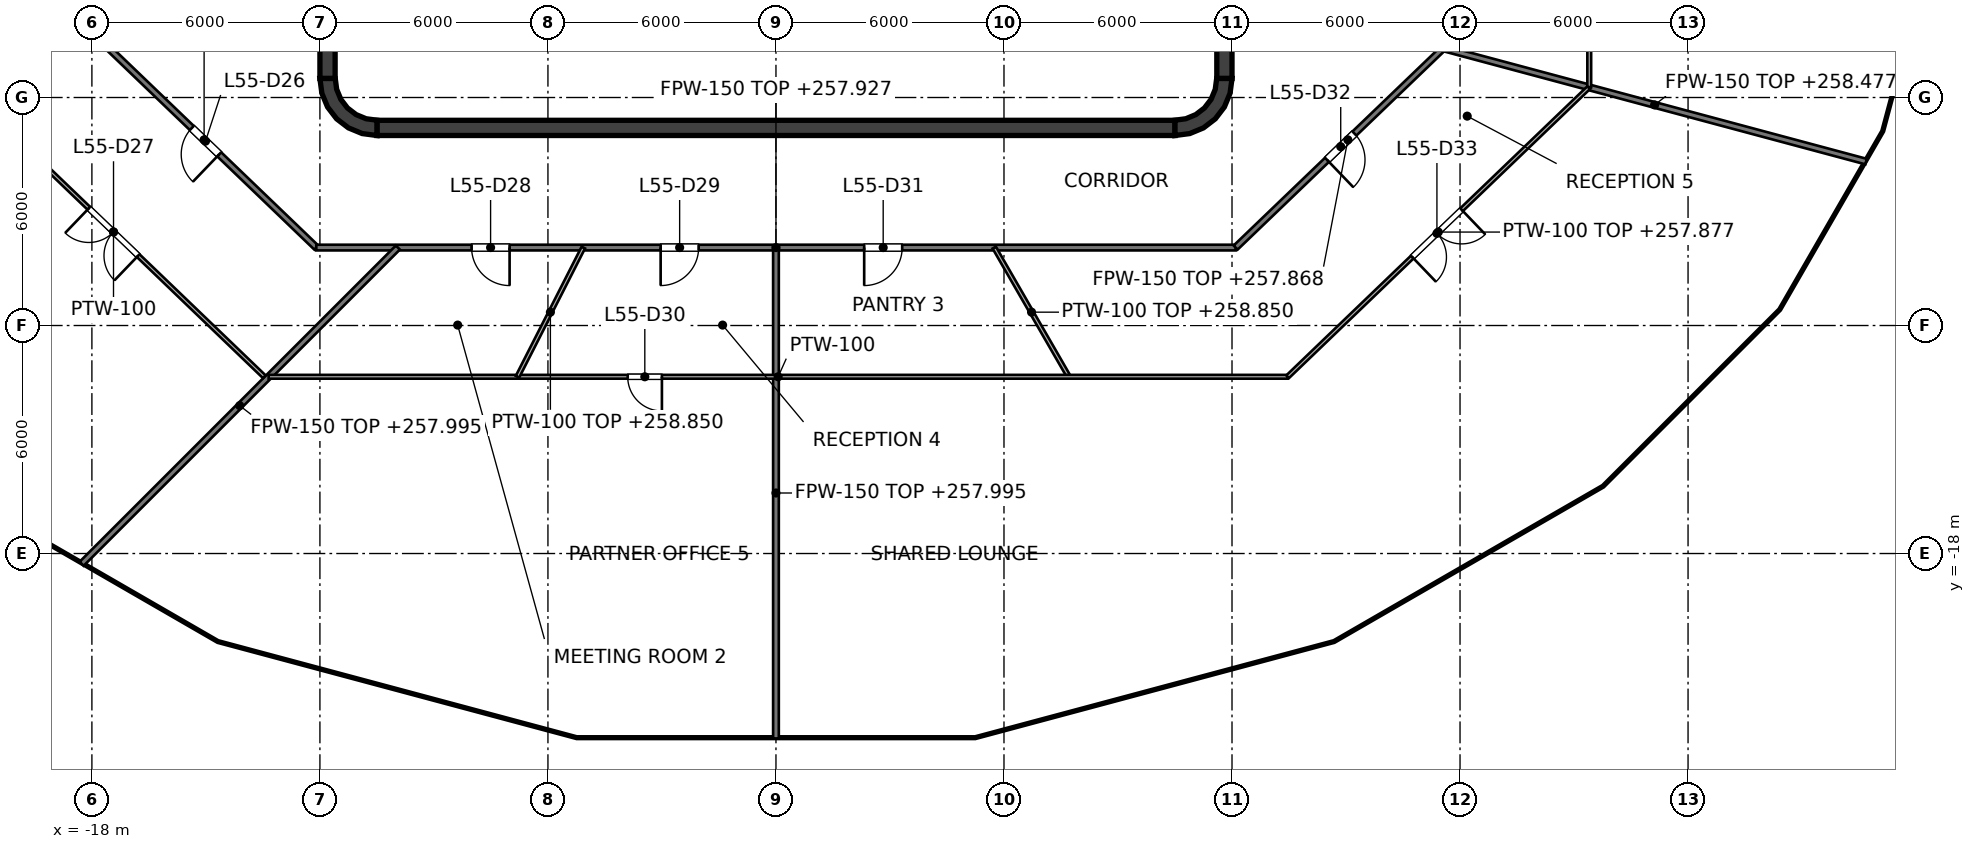
"""IFC4 building model, lengths in metres.
Left out: names, types, materials, properties, quantities, classifications, styles, units other than length and angle.
Written with IfcOpenShell. Run it as: python <this file> out.ifc"""

import sys

from ifc_helpers import new_model, si_unit, direction, frame, frame_2d, origin, place, context, subcontext, project, spatial, polyline, rectangle, outline, extrude, element, fill, save


model = new_model("IFC4")
c1 = context("Model", 3, precision=1e-05, world=origin(), true_north=direction((0.0, 1.0)))
c2 = subcontext(c1, "Body", "Model", "MODEL_VIEW")
j1 = project(units=[si_unit("LENGTHUNIT", "METRE"), si_unit("PLANEANGLEUNIT", "RADIAN")], contexts=[c1])
p1 = place(None, origin())
s1 = spatial("IfcSite", under=j1, at=p1, CompositionType="ELEMENT")
p2 = place(p1, origin())
s2 = spatial("IfcBuilding", under=s1, at=p2, CompositionType="ELEMENT")
p3 = place(p2, frame((0.0, 0.0, 255.0)))
s3 = spatial("IfcBuildingStorey", under=s2, at=p3, CompositionType="ELEMENT", Elevation=255.0)
p4 = place(p3, frame((-10.5, -6.8, 0.0), z_axis=(0.0, 0.0, 1.0), x_axis=(1.0, 0.0, 0.0)))
e1 = element("IfcWall", 1, at=p4, inside=s3, PredefinedType="SHEAR", context=c2, shape_type="SweptSolid", body=[
    extrude(rectangle(XDim=21.0, YDim=0.4, at=frame_2d((10.5, 0.0))), origin(), (0.0, 0.0, 1.0), 4.0),
])
p5 = place(p3, frame((11.8, -5.5, 0.0), z_axis=(0.0, 0.0, 1.0), x_axis=(0.0, 1.0, 0.0)))
e2 = element("IfcWall", 2, at=p5, inside=s3, PredefinedType="SHEAR", context=c2, shape_type="SweptSolid", body=[
    extrude(rectangle(XDim=11.0, YDim=0.4, at=frame_2d((5.5, 0.0))), origin(), (0.0, 0.0, 1.0), 4.0),
])
p6 = place(p5, frame((3.2, 0.0, 0.0)))
e3 = element("IfcOpeningElement", 3, at=p6, cuts=e2, PredefinedType="OPENING", context=c2, shape_type="SweptSolid", body=[
    extrude(rectangle(XDim=1.0, YDim=2.1, at=frame_2d((0.5, 1.05))), frame((0.0, 0.2, 0.0), z_axis=(0.0, -1.0, 0.0), x_axis=(1.0, 0.0, 0.0)), (0.0, 0.0, 1.0), 0.4),
])
p7 = place(p5, frame((6.1, 0.0, 0.0)))
e4 = element("IfcOpeningElement", 4, at=p7, cuts=e2, PredefinedType="OPENING", context=c2, shape_type="SweptSolid", body=[
    extrude(rectangle(XDim=1.0, YDim=2.1, at=frame_2d((0.5, 1.05))), frame((0.0, 0.2, 0.0), z_axis=(0.0, -1.0, 0.0), x_axis=(1.0, 0.0, 0.0)), (0.0, 0.0, 1.0), 0.4),
])
p8 = place(p5, frame((0.9, 0.0, 0.0)))
e5 = element("IfcOpeningElement", 5, at=p8, cuts=e2, PredefinedType="OPENING", context=c2, shape_type="SweptSolid", body=[
    extrude(rectangle(XDim=1.2, YDim=2.1, at=frame_2d((0.6, 1.05))), frame((0.0, 0.2, 0.0), z_axis=(0.0, -1.0, 0.0), x_axis=(1.0, 0.0, 0.0)), (0.0, 0.0, 1.0), 0.4),
])
p9 = place(p5, frame((8.9, 0.0, 0.0)))
e6 = element("IfcOpeningElement", 6, at=p9, cuts=e2, PredefinedType="OPENING", context=c2, shape_type="SweptSolid", body=[
    extrude(rectangle(XDim=1.2, YDim=2.1, at=frame_2d((0.6, 1.05))), frame((0.0, 0.2, 0.0), z_axis=(0.0, -1.0, 0.0), x_axis=(1.0, 0.0, 0.0)), (0.0, 0.0, 1.0), 0.4),
])
p10 = place(p3, frame((-11.8, -5.5, 0.0), z_axis=(0.0, 0.0, 1.0), x_axis=(0.0, 1.0, 0.0)))
e7 = element("IfcWall", 7, at=p10, inside=s3, PredefinedType="SHEAR", context=c2, shape_type="SweptSolid", body=[
    extrude(rectangle(XDim=11.0, YDim=0.4, at=frame_2d((5.5, 0.0))), origin(), (0.0, 0.0, 1.0), 4.0),
])
p11 = place(p10, frame((3.8, 0.0, 0.0)))
e8 = element("IfcOpeningElement", 8, at=p11, cuts=e7, PredefinedType="OPENING", context=c2, shape_type="SweptSolid", body=[
    extrude(rectangle(XDim=1.0, YDim=2.1, at=frame_2d((0.5, 1.05))), frame((0.0, 0.2, 0.0), z_axis=(0.0, -1.0, 0.0), x_axis=(1.0, 0.0, 0.0)), (0.0, 0.0, 1.0), 0.4),
])
p12 = place(p10, frame((6.7, 0.0, 0.0)))
e9 = element("IfcOpeningElement", 9, at=p12, cuts=e7, PredefinedType="OPENING", context=c2, shape_type="SweptSolid", body=[
    extrude(rectangle(XDim=1.0, YDim=2.1, at=frame_2d((0.5, 1.05))), frame((0.0, 0.2, 0.0), z_axis=(0.0, -1.0, 0.0), x_axis=(1.0, 0.0, 0.0)), (0.0, 0.0, 1.0), 0.4),
])
p13 = place(p10, frame((0.9, 0.0, 0.0)))
e10 = element("IfcOpeningElement", 10, at=p13, cuts=e7, PredefinedType="OPENING", context=c2, shape_type="SweptSolid", body=[
    extrude(rectangle(XDim=1.2, YDim=2.1, at=frame_2d((0.6, 1.05))), frame((0.0, 0.2, 0.0), z_axis=(0.0, -1.0, 0.0), x_axis=(1.0, 0.0, 0.0)), (0.0, 0.0, 1.0), 0.4),
])
p14 = place(p10, frame((8.9, 0.0, 0.0)))
e11 = element("IfcOpeningElement", 11, at=p14, cuts=e7, PredefinedType="OPENING", context=c2, shape_type="SweptSolid", body=[
    extrude(rectangle(XDim=1.2, YDim=2.1, at=frame_2d((0.6, 1.05))), frame((0.0, 0.2, 0.0), z_axis=(0.0, -1.0, 0.0), x_axis=(1.0, 0.0, 0.0)), (0.0, 0.0, 1.0), 0.4),
])
p15 = place(p3, origin())
e12 = element("IfcWall", 12, at=p15, inside=s3, PredefinedType="SHEAR", context=c2, shape_type="SweptSolid", body=[
    extrude(outline(polyline([(-10.5, -7.0), (-10.5, -6.596), (-10.784, -6.559), (-11.048, -6.45), (-11.275, -6.275), (-11.45, -6.048), (-11.559, -5.784), (-11.596, -5.5), (-12.0, -5.5), (-11.949, -5.888), (-11.799, -6.25), (-11.561, -6.561), (-11.25, -6.799), (-10.888, -6.949), (-10.5, -7.0)])), origin(), (0.0, 0.0, 1.0), 4.0),
])
e13 = element("IfcWall", 13, at=p15, inside=s3, PredefinedType="SHEAR", context=c2, shape_type="SweptSolid", body=[
    extrude(outline(polyline([(12.0, -5.5), (11.596, -5.5), (11.559, -5.784), (11.45, -6.048), (11.275, -6.275), (11.048, -6.45), (10.784, -6.559), (10.5, -6.596), (10.5, -7.0), (10.888, -6.949), (11.25, -6.799), (11.561, -6.561), (11.799, -6.25), (11.949, -5.888), (12.0, -5.5)])), origin(), (0.0, 0.0, 1.0), 4.0),
])
p16 = place(p3, frame((-1.2, -6.6, 0.0), z_axis=(0.0, 0.0, 1.0), x_axis=(0.0, 1.0, 0.0)))
e14 = element("IfcWall", 14, at=p16, inside=s3, PredefinedType="PARTITIONING", context=c2, shape_type="SweptSolid", body=[
    extrude(rectangle(XDim=2.5, YDim=0.15, at=frame_2d((1.25, 0.0))), origin(), (0.0, 0.0, 1.0), 3.85),
])
p17 = place(p16, frame((0.8, 0.0, 0.0)))
e15 = element("IfcOpeningElement", 15, at=p17, cuts=e14, PredefinedType="OPENING", context=c2, shape_type="SweptSolid", body=[
    extrude(rectangle(XDim=0.9, YDim=2.1, at=frame_2d((0.45, 1.05))), frame((0.0, 0.075, 0.0), z_axis=(0.0, -1.0, 0.0), x_axis=(1.0, 0.0, 0.0)), (0.0, 0.0, 1.0), 0.15),
])
p18 = place(p3, frame((9.0, -6.6, 0.0), z_axis=(0.0, 0.0, 1.0), x_axis=(0.0, 1.0, 0.0)))
e16 = element("IfcWall", 16, at=p18, inside=s3, PredefinedType="SOLIDWALL", context=c2, shape_type="SweptSolid", body=[
    extrude(rectangle(XDim=2.5, YDim=0.25, at=frame_2d((1.25, 0.0))), origin(), (0.0, 0.0, 1.0), 3.85),
])
p19 = place(p18, frame((0.65, 0.0, 0.0)))
e17 = element("IfcOpeningElement", 17, at=p19, cuts=e16, PredefinedType="OPENING", context=c2, shape_type="SweptSolid", body=[
    extrude(rectangle(XDim=1.2, YDim=2.1, at=frame_2d((0.6, 1.05))), frame((0.0, 0.125, 0.0), z_axis=(0.0, -1.0, 0.0), x_axis=(1.0, 0.0, 0.0)), (0.0, 0.0, 1.0), 0.25),
])
p20 = place(p3, frame((-9.0, -6.6, 0.0), z_axis=(0.0, 0.0, 1.0), x_axis=(0.0, 1.0, 0.0)))
e18 = element("IfcWall", 18, at=p20, inside=s3, PredefinedType="PARTITIONING", context=c2, shape_type="SweptSolid", body=[
    extrude(rectangle(XDim=2.5, YDim=0.25, at=frame_2d((1.25, 0.0))), origin(), (0.0, 0.0, 1.0), 3.85),
])
p21 = place(p20, frame((0.75, 0.0, 0.0)))
e19 = element("IfcOpeningElement", 19, at=p21, cuts=e18, PredefinedType="OPENING", context=c2, shape_type="SweptSolid", body=[
    extrude(rectangle(XDim=1.0, YDim=2.1, at=frame_2d((0.5, 1.05))), frame((0.0, 0.125, 0.0), z_axis=(0.0, -1.0, 0.0), x_axis=(1.0, 0.0, 0.0)), (0.0, 0.0, 1.0), 0.25),
])
p22 = place(p3, frame((3.15, -6.6, 0.0), z_axis=(0.0, 0.0, 1.0), x_axis=(0.0, 1.0, 0.0)))
e20 = element("IfcWall", 20, at=p22, inside=s3, PredefinedType="SOLIDWALL", context=c2, shape_type="SweptSolid", body=[
    extrude(rectangle(XDim=2.5, YDim=0.25, at=frame_2d((1.25, 0.0))), origin(), (0.0, 0.0, 1.0), 3.85),
])
p23 = place(p3, frame((-2.9, -6.6, 0.0), z_axis=(0.0, 0.0, 1.0), x_axis=(0.0, 1.0, 0.0)))
e21 = element("IfcWall", 21, at=p23, inside=s3, PredefinedType="PARTITIONING", context=c2, shape_type="SweptSolid", body=[
    extrude(rectangle(XDim=2.5, YDim=0.25, at=frame_2d((1.25, 0.0))), origin(), (0.0, 0.0, 1.0), 3.85),
])
p24 = place(p23, frame((0.8, 0.0, 0.0)))
e22 = element("IfcOpeningElement", 22, at=p24, cuts=e21, PredefinedType="OPENING", context=c2, shape_type="SweptSolid", body=[
    extrude(rectangle(XDim=0.9, YDim=2.1, at=frame_2d((0.45, 1.05))), frame((0.0, 0.125, 0.0), z_axis=(0.0, -1.0, 0.0), x_axis=(1.0, 0.0, 0.0)), (0.0, 0.0, 1.0), 0.25),
])
p25 = place(p3, frame((-18.0, -4.278, 0.0), z_axis=(0.0, 0.0, 1.0), x_axis=(0.721290181137, -0.692633001376, 0.0)))
e23 = element("IfcWall", 23, at=p25, inside=s3, PredefinedType="PARTITIONING", context=c2, shape_type="SweptSolid", body=[
    extrude(rectangle(XDim=8.187, YDim=0.15, at=frame_2d((4.094, 0.0))), origin(), (0.0, 0.0, 1.0), 2.918),
])
p26 = place(p25, frame((3.645, 0.0, 0.0)))
e24 = element("IfcOpeningElement", 24, at=p26, cuts=e23, PredefinedType="OPENING", context=c2, shape_type="SweptSolid", body=[
    extrude(rectangle(XDim=1.0, YDim=2.1, at=frame_2d((0.5, 1.05))), frame((0.0, 0.075, 0.0), z_axis=(0.0, -1.0, 0.0), x_axis=(1.0, 0.0, 0.0)), (0.0, 0.0, 1.0), 0.15),
])
p27 = place(p3, frame((17.556, -4.704, 0.0), z_axis=(0.0, 0.0, 1.0), x_axis=(0.9659158877, -0.258856133573, 0.0)))
e25 = element("IfcWall", 25, at=p27, inside=s3, PredefinedType="PARTITIONING", context=c2, shape_type="SweptSolid", body=[
    extrude(rectangle(XDim=11.521, YDim=0.15, at=frame_2d((5.76, 0.0))), origin(), (0.0, 0.0, 1.0), 3.477),
])
p28 = place(p3, frame((-12.095, -9.949, 0.0), z_axis=(0.0, 0.0, 1.0), x_axis=(1.0, 0.0, 0.0)))
e26 = element("IfcWall", 26, at=p28, inside=s3, PredefinedType="PARTITIONING", context=c2, shape_type="SweptSolid", body=[
    extrude(rectangle(XDim=24.19, YDim=0.15, at=frame_2d((12.095, 0.0))), origin(), (0.0, 0.0, 1.0), 2.927),
])
p29 = place(p28, frame((4.086, 0.0, 0.0)))
e27 = element("IfcOpeningElement", 27, at=p29, cuts=e26, PredefinedType="OPENING", context=c2, shape_type="SweptSolid", body=[
    extrude(rectangle(XDim=1.0, YDim=2.1, at=frame_2d((0.5, 1.05))), frame((0.0, 0.075, 0.0), z_axis=(0.0, -1.0, 0.0), x_axis=(1.0, 0.0, 0.0)), (0.0, 0.0, 1.0), 0.15),
])
p30 = place(p28, frame((9.061, 0.0, 0.0)))
e28 = element("IfcOpeningElement", 28, at=p30, cuts=e26, PredefinedType="OPENING", context=c2, shape_type="SweptSolid", body=[
    extrude(rectangle(XDim=1.0, YDim=2.1, at=frame_2d((0.5, 1.05))), frame((0.0, 0.075, 0.0), z_axis=(0.0, -1.0, 0.0), x_axis=(1.0, 0.0, 0.0)), (0.0, 0.0, 1.0), 0.15),
])
p31 = place(p28, frame((14.417, 0.0, 0.0)))
e29 = element("IfcOpeningElement", 29, at=p31, cuts=e26, PredefinedType="OPENING", context=c2, shape_type="SweptSolid", body=[
    extrude(rectangle(XDim=1.0, YDim=2.1, at=frame_2d((0.5, 1.05))), frame((0.0, 0.075, 0.0), z_axis=(0.0, -1.0, 0.0), x_axis=(1.0, 0.0, 0.0)), (0.0, 0.0, 1.0), 0.15),
])
p32 = place(p3, frame((12.095, -9.949, 0.0), z_axis=(0.0, 0.0, 1.0), x_axis=(0.721348586031, 0.692572174889, 0.0)))
e30 = element("IfcWall", 30, at=p32, inside=s3, PredefinedType="PARTITIONING", context=c2, shape_type="SweptSolid", body=[
    extrude(rectangle(XDim=8.187, YDim=0.15, at=frame_2d((4.094, 0.0))), origin(), (0.0, 0.0, 1.0), 2.868),
])
p33 = place(p32, frame((3.334, 0.0, 0.0)))
e31 = element("IfcOpeningElement", 31, at=p33, cuts=e30, PredefinedType="OPENING", context=c2, shape_type="SweptSolid", body=[
    extrude(rectangle(XDim=1.0, YDim=2.1, at=frame_2d((0.5, 1.05))), frame((0.0, 0.075, 0.0), z_axis=(0.0, -1.0, 0.0), x_axis=(1.0, 0.0, 0.0)), (0.0, 0.0, 1.0), 0.15),
])
p34 = place(p3, frame((-18.27, -18.27, 0.0), z_axis=(0.0, 0.0, 1.0), x_axis=(0.707106781187, 0.707106781187, 0.0)))
e32 = element("IfcWall", 32, at=p34, inside=s3, PredefinedType="PARTITIONING", context=c2, shape_type="SweptSolid", body=[
    extrude(rectangle(XDim=11.768, YDim=0.15, at=frame_2d((5.884, 0.0))), origin(), (0.0, 0.0, 1.0), 2.995),
])
p35 = place(p3, frame((0.0, -22.866, 0.0), z_axis=(0.0, 0.0, 1.0), x_axis=(0.0, 1.0, 0.0)))
e33 = element("IfcWall", 33, at=p35, inside=s3, PredefinedType="PARTITIONING", context=c2, shape_type="SweptSolid", body=[
    extrude(rectangle(XDim=12.917, YDim=0.15, at=frame_2d((6.458, 0.0))), origin(), (0.0, 0.0, 1.0), 2.995),
])
p36 = place(p3, frame((5.744, -9.949, 0.0), z_axis=(0.0, 0.0, 1.0), x_axis=(0.500011323479, -0.866018866072, 0.0)))
e34 = element("IfcWall", 34, at=p36, inside=s3, PredefinedType="PARTITIONING", context=c2, shape_type="SweptSolid", body=[
    extrude(rectangle(XDim=3.926, YDim=0.1, at=frame_2d((1.963, 0.0))), origin(), (0.0, 0.0, 1.0), 3.85),
])
p37 = place(p3, frame((-21.4, -5.727, 0.0), z_axis=(0.0, 0.0, 1.0), x_axis=(0.72128312314, -0.692640351317, 0.0)))
e35 = element("IfcWall", 35, at=p37, inside=s3, PredefinedType="PARTITIONING", context=c2, shape_type="SweptSolid", body=[
    extrude(rectangle(XDim=11.004, YDim=0.1, at=frame_2d((5.502, 0.0))), origin(), (0.0, 0.0, 1.0), 2.927),
])
p38 = place(p37, frame((4.603, 0.0, 0.0)))
e36 = element("IfcOpeningElement", 36, at=p38, cuts=e35, PredefinedType="OPENING", context=c2, shape_type="SweptSolid", body=[
    extrude(rectangle(XDim=1.8, YDim=2.1, at=frame_2d((0.9, 1.05))), frame((0.0, 0.05, 0.0), z_axis=(0.0, -1.0, 0.0), x_axis=(1.0, 0.0, 0.0)), (0.0, 0.0, 1.0), 0.1),
])
p39 = place(p3, frame((-13.349, -13.349, 0.0), z_axis=(0.0, 0.0, 1.0), x_axis=(1.0, 0.0, 0.0)))
e37 = element("IfcWall", 37, at=p39, inside=s3, PredefinedType="PARTITIONING", context=c2, shape_type="SweptSolid", body=[
    extrude(rectangle(XDim=26.812, YDim=0.1, at=frame_2d((13.406, 0.0))), origin(), (0.0, 0.0, 1.0), 2.927),
])
p40 = place(p39, frame((9.448, 0.0, 0.0)))
e38 = element("IfcOpeningElement", 38, at=p40, cuts=e37, PredefinedType="OPENING", context=c2, shape_type="SweptSolid", body=[
    extrude(rectangle(XDim=0.9, YDim=2.1, at=frame_2d((0.45, 1.05))), frame((0.0, 0.05, 0.0), z_axis=(0.0, -1.0, 0.0), x_axis=(1.0, 0.0, 0.0)), (0.0, 0.0, 1.0), 0.1),
])
p41 = place(p3, frame((13.463, -13.349, 0.0), z_axis=(0.0, 0.0, 1.0), x_axis=(0.721271950356, 0.692651985942, 0.0)))
e39 = element("IfcWall", 39, at=p41, inside=s3, PredefinedType="PARTITIONING", context=c2, shape_type="SweptSolid", body=[
    extrude(rectangle(XDim=10.996, YDim=0.1, at=frame_2d((5.498, 0.0))), origin(), (0.0, 0.0, 1.0), 2.877),
])
p42 = place(p41, frame((4.547, 0.0, 0.0)))
e40 = element("IfcOpeningElement", 40, at=p42, cuts=e39, PredefinedType="OPENING", context=c2, shape_type="SweptSolid", body=[
    extrude(rectangle(XDim=1.8, YDim=2.1, at=frame_2d((0.9, 1.05))), frame((0.0, 0.05, 0.0), z_axis=(0.0, -1.0, 0.0), x_axis=(1.0, 0.0, 0.0)), (0.0, 0.0, 1.0), 0.1),
])
p43 = place(p3, frame((-6.802, -13.349, 0.0), z_axis=(0.0, 0.0, 1.0), x_axis=(0.454083899838, 0.890958928295, 0.0)))
e41 = element("IfcWall", 41, at=p43, inside=s3, PredefinedType="PARTITIONING", context=c2, shape_type="SweptSolid", body=[
    extrude(rectangle(XDim=3.816, YDim=0.1, at=frame_2d((1.908, 0.0))), origin(), (0.0, 0.0, 1.0), 3.85),
])
p44 = place(p3, frame((21.4, -5.727, 0.0), z_axis=(0.0, 0.0, 1.0), x_axis=(0.0, 1.0, 0.0)))
e42 = element("IfcWall", 42, at=p44, inside=s3, PredefinedType="PARTITIONING", context=c2, shape_type="SweptSolid", body=[
    extrude(rectangle(XDim=11.454, YDim=0.1, at=frame_2d((5.727, 0.0))), origin(), (0.0, 0.0, 1.0), 2.868),
])
p45 = place(p19, origin())
e43 = element("IfcDoor", 43, at=p45, inside=s3, OperationType="SINGLE_SWING_LEFT", PredefinedType="DOOR", context=c2, shape_type="SweptSolid", body=[
    extrude(rectangle(XDim=1.2, YDim=2.1, at=frame_2d((0.6, 1.05))), frame((0.0, 0.025, 0.0), z_axis=(0.0, -1.0, 0.0), x_axis=(1.0, 0.0, 0.0)), (0.0, 0.0, 1.0), 0.05),
])
fill(e17, e43)
p46 = place(p21, origin())
e44 = element("IfcDoor", 44, at=p46, inside=s3, OperationType="SINGLE_SWING_LEFT", PredefinedType="DOOR", context=c2, shape_type="SweptSolid", body=[
    extrude(rectangle(XDim=1.0, YDim=2.1, at=frame_2d((0.5, 1.05))), frame((0.0, 0.025, 0.0), z_axis=(0.0, -1.0, 0.0), x_axis=(1.0, 0.0, 0.0)), (0.0, 0.0, 1.0), 0.05),
])
fill(e19, e44)
p47 = place(p24, origin())
e45 = element("IfcDoor", 45, at=p47, inside=s3, OperationType="SINGLE_SWING_RIGHT", PredefinedType="DOOR", context=c2, shape_type="SweptSolid", body=[
    extrude(rectangle(XDim=0.9, YDim=2.1, at=frame_2d((0.45, 1.05))), frame((0.0, 0.025, 0.0), z_axis=(0.0, -1.0, 0.0), x_axis=(1.0, 0.0, 0.0)), (0.0, 0.0, 1.0), 0.05),
])
fill(e22, e45)
p48 = place(p17, origin())
e46 = element("IfcDoor", 46, at=p48, inside=s3, OperationType="SINGLE_SWING_RIGHT", PredefinedType="DOOR", context=c2, shape_type="SweptSolid", body=[
    extrude(rectangle(XDim=0.9, YDim=2.1, at=frame_2d((0.45, 1.05))), frame((0.0, 0.025, 0.0), z_axis=(0.0, -1.0, 0.0), x_axis=(1.0, 0.0, 0.0)), (0.0, 0.0, 1.0), 0.05),
])
fill(e15, e46)
p49 = place(p26, origin())
e47 = element("IfcDoor", 47, at=p49, inside=s3, OperationType="SINGLE_SWING_RIGHT", PredefinedType="DOOR", context=c2, shape_type="SweptSolid", body=[
    extrude(rectangle(XDim=1.0, YDim=2.1, at=frame_2d((0.5, 1.05))), frame((0.0, 0.025, 0.0), z_axis=(0.0, -1.0, 0.0), x_axis=(1.0, 0.0, 0.0)), (0.0, 0.0, 1.0), 0.05),
])
fill(e24, e47)
p50 = place(p38, origin())
e48 = element("IfcDoor", 48, at=p50, inside=s3, OperationType="DOUBLE_DOOR_SINGLE_SWING", PredefinedType="DOOR", context=c2, shape_type="SweptSolid", body=[
    extrude(rectangle(XDim=1.8, YDim=2.1, at=frame_2d((0.9, 1.05))), frame((0.0, 0.025, 0.0), z_axis=(0.0, -1.0, 0.0), x_axis=(1.0, 0.0, 0.0)), (0.0, 0.0, 1.0), 0.05),
])
fill(e36, e48)
p51 = place(p29, origin())
e49 = element("IfcDoor", 49, at=p51, inside=s3, OperationType="SINGLE_SWING_RIGHT", PredefinedType="DOOR", context=c2, shape_type="SweptSolid", body=[
    extrude(rectangle(XDim=1.0, YDim=2.1, at=frame_2d((0.5, 1.05))), frame((0.0, 0.025, 0.0), z_axis=(0.0, -1.0, 0.0), x_axis=(1.0, 0.0, 0.0)), (0.0, 0.0, 1.0), 0.05),
])
fill(e27, e49)
p52 = place(p30, origin())
e50 = element("IfcDoor", 50, at=p52, inside=s3, OperationType="SINGLE_SWING_LEFT", PredefinedType="DOOR", context=c2, shape_type="SweptSolid", body=[
    extrude(rectangle(XDim=1.0, YDim=2.1, at=frame_2d((0.5, 1.05))), frame((0.0, 0.025, 0.0), z_axis=(0.0, -1.0, 0.0), x_axis=(1.0, 0.0, 0.0)), (0.0, 0.0, 1.0), 0.05),
])
fill(e28, e50)
p53 = place(p40, origin())
e51 = element("IfcDoor", 51, at=p53, inside=s3, OperationType="SINGLE_SWING_RIGHT", PredefinedType="DOOR", context=c2, shape_type="SweptSolid", body=[
    extrude(rectangle(XDim=0.9, YDim=2.1, at=frame_2d((0.45, 1.05))), frame((0.0, 0.025, 0.0), z_axis=(0.0, -1.0, 0.0), x_axis=(1.0, 0.0, 0.0)), (0.0, 0.0, 1.0), 0.05),
])
fill(e38, e51)
p54 = place(p31, origin())
e52 = element("IfcDoor", 52, at=p54, inside=s3, OperationType="SINGLE_SWING_LEFT", PredefinedType="DOOR", context=c2, shape_type="SweptSolid", body=[
    extrude(rectangle(XDim=1.0, YDim=2.1, at=frame_2d((0.5, 1.05))), frame((0.0, 0.025, 0.0), z_axis=(0.0, -1.0, 0.0), x_axis=(1.0, 0.0, 0.0)), (0.0, 0.0, 1.0), 0.05),
])
fill(e29, e52)
p55 = place(p33, origin())
e53 = element("IfcDoor", 53, at=p55, inside=s3, OperationType="SINGLE_SWING_LEFT", PredefinedType="DOOR", context=c2, shape_type="SweptSolid", body=[
    extrude(rectangle(XDim=1.0, YDim=2.1, at=frame_2d((0.5, 1.05))), frame((0.0, 0.025, 0.0), z_axis=(0.0, -1.0, 0.0), x_axis=(1.0, 0.0, 0.0)), (0.0, 0.0, 1.0), 0.05),
])
fill(e31, e53)
p56 = place(p42, origin())
e54 = element("IfcDoor", 54, at=p56, inside=s3, OperationType="DOUBLE_DOOR_SINGLE_SWING", PredefinedType="DOOR", context=c2, shape_type="SweptSolid", body=[
    extrude(rectangle(XDim=1.8, YDim=2.1, at=frame_2d((0.9, 1.05))), frame((0.0, 0.025, 0.0), z_axis=(0.0, -1.0, 0.0), x_axis=(1.0, 0.0, 0.0)), (0.0, 0.0, 1.0), 0.05),
])
fill(e40, e54)
save(model, sys.argv[1])
